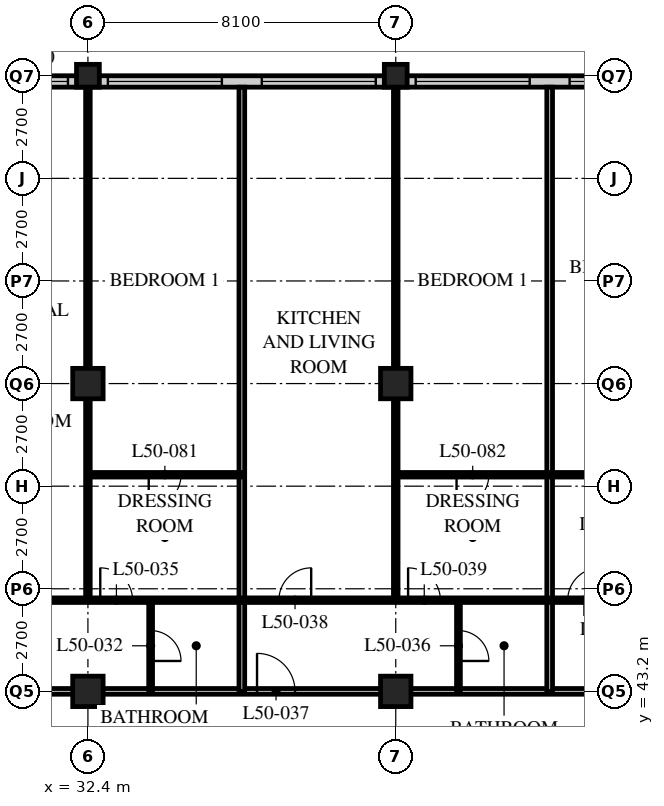
"""IFC4 building model, lengths in metres.
Left out: names, types, materials, properties, quantities, classifications, styles, units other than length and angle.
Written with IfcOpenShell. Run it as: python <this file> out.ifc"""

import sys

from ifc_helpers import new_model, si_unit, direction, frame, frame_2d, origin, origin_2d, place, context, subcontext, project, spatial, rectangle, hollow_rectangle, extrude, element, fill, save


model = new_model("IFC4")
c1 = context("Model", 3, precision=1e-05, world=origin(), true_north=direction((0.0, 1.0)))
c2 = subcontext(c1, "Body", "Model", "MODEL_VIEW")
j1 = project(units=[si_unit("LENGTHUNIT", "METRE"), si_unit("PLANEANGLEUNIT", "RADIAN")], contexts=[c1])
p1 = place(None, origin())
s1 = spatial("IfcSite", under=j1, at=p1, CompositionType="ELEMENT")
p2 = place(p1, origin())
s2 = spatial("IfcBuilding", under=s1, at=p2, CompositionType="ELEMENT")
p3 = place(p2, frame((0.0, 0.0, 195.6)))
s3 = spatial("IfcBuildingStorey", under=s2, at=p3, CompositionType="ELEMENT", Elevation=195.6)
for number, where, z_axis, x_axis in (
    (1, (32.4, 43.2, 0.0), (0.0, 0.0, 1.0), (1.0, 0.0, 0.0)),
    (2, (32.4, 51.3, 0.0), (0.0, 0.0, 1.0), (1.0, 0.0, 0.0)),
):
    element("IfcColumn", number, at=place(p3, frame(where, z_axis=z_axis, x_axis=x_axis)), inside=s3, PredefinedType="COLUMN", context=c2, shape_type="SweptSolid", body=[
        extrude(hollow_rectangle(XDim=0.8, YDim=0.8, WallThickness=0.08, at=origin_2d()), origin(), (0.0, 0.0, 1.0), 3.6),
    ])
p4 = place(p3, frame((32.4, 59.4, 0.0), z_axis=(0.0, 0.0, 1.0), x_axis=(1.0, 0.0, 0.0)))
e3 = element("IfcColumn", 3, at=p4, inside=s3, PredefinedType="COLUMN", context=c2, shape_type="SweptSolid", body=[
    extrude(hollow_rectangle(XDim=0.6, YDim=0.6, WallThickness=0.05, at=origin_2d()), origin(), (0.0, 0.0, 1.0), 3.6),
])
for number, where, z_axis, x_axis in (
    (4, (40.5, 43.2, 0.0), (0.0, 0.0, 1.0), (1.0, 0.0, 0.0)),
    (5, (40.5, 51.3, 0.0), (0.0, 0.0, 1.0), (1.0, 0.0, 0.0)),
):
    element("IfcColumn", number, at=place(p3, frame(where, z_axis=z_axis, x_axis=x_axis)), inside=s3, PredefinedType="COLUMN", context=c2, shape_type="SweptSolid", body=[
        extrude(hollow_rectangle(XDim=0.8, YDim=0.8, WallThickness=0.08, at=origin_2d()), origin(), (0.0, 0.0, 1.0), 3.6),
    ])
p5 = place(p3, frame((40.5, 59.4, 0.0), z_axis=(0.0, 0.0, 1.0), x_axis=(1.0, 0.0, 0.0)))
e6 = element("IfcColumn", 6, at=p5, inside=s3, PredefinedType="COLUMN", context=c2, shape_type="SweptSolid", body=[
    extrude(hollow_rectangle(XDim=0.6, YDim=0.6, WallThickness=0.05, at=origin_2d()), origin(), (0.0, 0.0, 1.0), 3.6),
])
p6 = place(p3, frame((48.3, 59.25, 0.0), z_axis=(0.0, 0.0, 1.0), x_axis=(-1.0, 0.0, 0.0)))
e7 = element("IfcWall", 7, at=p6, inside=s3, PredefinedType="SOLIDWALL", context=c2, shape_type="SweptSolid", body=[
    extrude(rectangle(XDim=40.2, YDim=0.3, at=frame_2d((20.1, 0.0))), origin(), (0.0, 0.0, 1.0), 3.39),
])
p7 = place(p6, frame((0.225, 0.0, 0.6)))
e8 = element("IfcOpeningElement", 8, at=p7, cuts=e7, PredefinedType="OPENING", context=c2, shape_type="SweptSolid", body=[
    extrude(rectangle(XDim=3.0, YDim=2.4, at=frame_2d((1.5, 1.2))), frame((0.0, 0.16, 0.0), z_axis=(0.0, -1.0, 0.0), x_axis=(1.0, 0.0, 0.0)), (0.0, 0.0, 1.0), 0.32),
])
p8 = place(p6, frame((4.275, 0.0, 0.6)))
e9 = element("IfcOpeningElement", 9, at=p8, cuts=e7, PredefinedType="OPENING", context=c2, shape_type="SweptSolid", body=[
    extrude(rectangle(XDim=3.0, YDim=2.4, at=frame_2d((1.5, 1.2))), frame((0.0, 0.16, 0.0), z_axis=(0.0, -1.0, 0.0), x_axis=(1.0, 0.0, 0.0)), (0.0, 0.0, 1.0), 0.32),
])
p9 = place(p6, frame((8.325, 0.0, 0.6)))
e10 = element("IfcOpeningElement", 10, at=p9, cuts=e7, PredefinedType="OPENING", context=c2, shape_type="SweptSolid", body=[
    extrude(rectangle(XDim=3.0, YDim=2.4, at=frame_2d((1.5, 1.2))), frame((0.0, 0.16, 0.0), z_axis=(0.0, -1.0, 0.0), x_axis=(1.0, 0.0, 0.0)), (0.0, 0.0, 1.0), 0.32),
])
p10 = place(p6, frame((12.375, 0.0, 0.6)))
e11 = element("IfcOpeningElement", 11, at=p10, cuts=e7, PredefinedType="OPENING", context=c2, shape_type="SweptSolid", body=[
    extrude(rectangle(XDim=3.0, YDim=2.4, at=frame_2d((1.5, 1.2))), frame((0.0, 0.16, 0.0), z_axis=(0.0, -1.0, 0.0), x_axis=(1.0, 0.0, 0.0)), (0.0, 0.0, 1.0), 0.32),
])
p11 = place(p6, frame((16.425, 0.0, 0.6)))
e12 = element("IfcOpeningElement", 12, at=p11, cuts=e7, PredefinedType="OPENING", context=c2, shape_type="SweptSolid", body=[
    extrude(rectangle(XDim=3.0, YDim=2.4, at=frame_2d((1.5, 1.2))), frame((0.0, 0.16, 0.0), z_axis=(0.0, -1.0, 0.0), x_axis=(1.0, 0.0, 0.0)), (0.0, 0.0, 1.0), 0.32),
])
p12 = place(p6, frame((20.475, 0.0, 0.6)))
e13 = element("IfcOpeningElement", 13, at=p12, cuts=e7, PredefinedType="OPENING", context=c2, shape_type="SweptSolid", body=[
    extrude(rectangle(XDim=3.0, YDim=2.4, at=frame_2d((1.5, 1.2))), frame((0.0, 0.16, 0.0), z_axis=(0.0, -1.0, 0.0), x_axis=(1.0, 0.0, 0.0)), (0.0, 0.0, 1.0), 0.32),
])
p13 = place(p6, frame((24.525, 0.0, 0.6)))
e14 = element("IfcOpeningElement", 14, at=p13, cuts=e7, PredefinedType="OPENING", context=c2, shape_type="SweptSolid", body=[
    extrude(rectangle(XDim=3.0, YDim=2.4, at=frame_2d((1.5, 1.2))), frame((0.0, 0.16, 0.0), z_axis=(0.0, -1.0, 0.0), x_axis=(1.0, 0.0, 0.0)), (0.0, 0.0, 1.0), 0.32),
])
p14 = place(p6, frame((28.575, 0.0, 0.6)))
e15 = element("IfcOpeningElement", 15, at=p14, cuts=e7, PredefinedType="OPENING", context=c2, shape_type="SweptSolid", body=[
    extrude(rectangle(XDim=3.0, YDim=2.4, at=frame_2d((1.5, 1.2))), frame((0.0, 0.16, 0.0), z_axis=(0.0, -1.0, 0.0), x_axis=(1.0, 0.0, 0.0)), (0.0, 0.0, 1.0), 0.32),
])
p15 = place(p6, frame((32.625, 0.0, 0.6)))
e16 = element("IfcOpeningElement", 16, at=p15, cuts=e7, PredefinedType="OPENING", context=c2, shape_type="SweptSolid", body=[
    extrude(rectangle(XDim=3.0, YDim=2.4, at=frame_2d((1.5, 1.2))), frame((0.0, 0.16, 0.0), z_axis=(0.0, -1.0, 0.0), x_axis=(1.0, 0.0, 0.0)), (0.0, 0.0, 1.0), 0.32),
])
p16 = place(p6, frame((36.675, 0.0, 0.6)))
e17 = element("IfcOpeningElement", 17, at=p16, cuts=e7, PredefinedType="OPENING", context=c2, shape_type="SweptSolid", body=[
    extrude(rectangle(XDim=3.0, YDim=2.4, at=frame_2d((1.5, 1.2))), frame((0.0, 0.16, 0.0), z_axis=(0.0, -1.0, 0.0), x_axis=(1.0, 0.0, 0.0)), (0.0, 0.0, 1.0), 0.32),
])
p17 = place(p3, frame((8.1, 43.2, 0.0), z_axis=(0.0, 0.0, 1.0), x_axis=(1.0, 0.0, 0.0)))
e18 = element("IfcWall", 18, at=p17, inside=s3, PredefinedType="PARTITIONING", context=c2, shape_type="SweptSolid", body=[
    extrude(rectangle(XDim=40.5, YDim=0.15, at=frame_2d((20.25, 0.0))), origin(), (0.0, 0.0, 1.0), 2.778),
])
p18 = place(p17, frame((4.45, 0.0, 0.0)))
e19 = element("IfcOpeningElement", 19, at=p18, cuts=e18, PredefinedType="OPENING", context=c2, shape_type="SweptSolid", body=[
    extrude(rectangle(XDim=1.0, YDim=2.1, at=frame_2d((0.5, 1.05))), frame((0.0, 0.085, 0.0), z_axis=(0.0, -1.0, 0.0), x_axis=(1.0, 0.0, 0.0)), (0.0, 0.0, 1.0), 0.17),
])
p19 = place(p17, frame((20.65, 0.0, 0.0)))
e20 = element("IfcOpeningElement", 20, at=p19, cuts=e18, PredefinedType="OPENING", context=c2, shape_type="SweptSolid", body=[
    extrude(rectangle(XDim=1.0, YDim=2.1, at=frame_2d((0.5, 1.05))), frame((0.0, 0.085, 0.0), z_axis=(0.0, -1.0, 0.0), x_axis=(1.0, 0.0, 0.0)), (0.0, 0.0, 1.0), 0.17),
])
p20 = place(p17, frame((28.75, 0.0, 0.0)))
e21 = element("IfcOpeningElement", 21, at=p20, cuts=e18, PredefinedType="OPENING", context=c2, shape_type="SweptSolid", body=[
    extrude(rectangle(XDim=1.0, YDim=2.1, at=frame_2d((0.5, 1.05))), frame((0.0, 0.085, 0.0), z_axis=(0.0, -1.0, 0.0), x_axis=(1.0, 0.0, 0.0)), (0.0, 0.0, 1.0), 0.17),
])
p21 = place(p17, frame((37.975, 0.0, 0.0)))
e22 = element("IfcOpeningElement", 22, at=p21, cuts=e18, PredefinedType="OPENING", context=c2, shape_type="SweptSolid", body=[
    extrude(rectangle(XDim=1.0, YDim=2.1, at=frame_2d((0.5, 1.05))), frame((0.0, 0.085, 0.0), z_axis=(0.0, -1.0, 0.0), x_axis=(1.0, 0.0, 0.0)), (0.0, 0.0, 1.0), 0.17),
])
p22 = place(p17, frame((1.525, 0.0, 0.0)))
e23 = element("IfcOpeningElement", 23, at=p22, cuts=e18, PredefinedType="OPENING", context=c2, shape_type="SweptSolid", body=[
    extrude(rectangle(XDim=1.0, YDim=2.1, at=frame_2d((0.5, 1.05))), frame((0.0, 0.085, 0.0), z_axis=(0.0, -1.0, 0.0), x_axis=(1.0, 0.0, 0.0)), (0.0, 0.0, 1.0), 0.17),
])
p23 = place(p3, frame((34.05, 43.2, 0.0), z_axis=(0.0, 0.0, 1.0), x_axis=(0.0, 1.0, 0.0)))
e24 = element("IfcWall", 24, at=p23, inside=s3, PredefinedType="PARTITIONING", context=c2, shape_type="SweptSolid", body=[
    extrude(rectangle(XDim=2.4, YDim=0.1, at=frame_2d((1.2, 0.0))), origin(), (0.0, 0.0, 1.0), 3.39),
])
p24 = place(p23, frame((0.8, 0.0, 0.0)))
e25 = element("IfcOpeningElement", 25, at=p24, cuts=e24, PredefinedType="OPENING", context=c2, shape_type="SweptSolid", body=[
    extrude(rectangle(XDim=0.8, YDim=2.1, at=frame_2d((0.4, 1.05))), frame((0.0, 0.06, 0.0), z_axis=(0.0, -1.0, 0.0), x_axis=(1.0, 0.0, 0.0)), (0.0, 0.0, 1.0), 0.12),
])
p25 = place(p3, frame((32.4, 45.6, 0.0), z_axis=(0.0, 0.0, 1.0), x_axis=(0.0, 1.0, 0.0)))
e26 = element("IfcWall", 26, at=p25, inside=s3, PredefinedType="PARTITIONING", context=c2, shape_type="SweptSolid", body=[
    extrude(rectangle(XDim=13.5, YDim=0.12, at=frame_2d((6.75, 0.0))), origin(), (0.0, 0.0, 1.0), 2.778),
])
p26 = place(p3, frame((36.45, 43.2, 0.0), z_axis=(0.0, 0.0, 1.0), x_axis=(0.0, 1.0, 0.0)))
e27 = element("IfcWall", 27, at=p26, inside=s3, PredefinedType="PARTITIONING", context=c2, shape_type="SweptSolid", body=[
    extrude(rectangle(XDim=15.9, YDim=0.15, at=frame_2d((7.95, 0.0))), origin(), (0.0, 0.0, 1.0), 3.39),
])
p27 = place(p3, frame((42.15, 43.2, 0.0), z_axis=(0.0, 0.0, 1.0), x_axis=(0.0, 1.0, 0.0)))
e28 = element("IfcWall", 28, at=p27, inside=s3, PredefinedType="PARTITIONING", context=c2, shape_type="SweptSolid", body=[
    extrude(rectangle(XDim=2.4, YDim=0.1, at=frame_2d((1.2, 0.0))), origin(), (0.0, 0.0, 1.0), 3.39),
])
p28 = place(p27, frame((0.8, 0.0, 0.0)))
e29 = element("IfcOpeningElement", 29, at=p28, cuts=e28, PredefinedType="OPENING", context=c2, shape_type="SweptSolid", body=[
    extrude(rectangle(XDim=0.8, YDim=2.1, at=frame_2d((0.4, 1.05))), frame((0.0, 0.06, 0.0), z_axis=(0.0, -1.0, 0.0), x_axis=(1.0, 0.0, 0.0)), (0.0, 0.0, 1.0), 0.12),
])
p29 = place(p3, frame((40.5, 45.6, 0.0), z_axis=(0.0, 0.0, 1.0), x_axis=(0.0, 1.0, 0.0)))
e30 = element("IfcWall", 30, at=p29, inside=s3, PredefinedType="PARTITIONING", context=c2, shape_type="SweptSolid", body=[
    extrude(rectangle(XDim=13.5, YDim=0.12, at=frame_2d((6.75, 0.0))), origin(), (0.0, 0.0, 1.0), 2.778),
])
p30 = place(p3, frame((44.55, 43.2, 0.0), z_axis=(0.0, 0.0, 1.0), x_axis=(0.0, 1.0, 0.0)))
e31 = element("IfcWall", 31, at=p30, inside=s3, PredefinedType="PARTITIONING", context=c2, shape_type="SweptSolid", body=[
    extrude(rectangle(XDim=15.9, YDim=0.15, at=frame_2d((7.95, 0.0))), origin(), (0.0, 0.0, 1.0), 3.39),
])
p31 = place(p3, frame((4.1, 45.6, 0.0), z_axis=(0.0, 0.0, 1.0), x_axis=(1.0, 0.0, 0.0)))
e32 = element("IfcWall", 32, at=p31, inside=s3, PredefinedType="PARTITIONING", context=c2, shape_type="SweptSolid", body=[
    extrude(rectangle(XDim=48.5, YDim=0.12, at=frame_2d((24.25, 0.0))), origin(), (0.0, 0.0, 1.0), 3.39),
])
p32 = place(p31, frame((9.025, 0.0, 0.0)))
e33 = element("IfcOpeningElement", 33, at=p32, cuts=e32, PredefinedType="OPENING", context=c2, shape_type="SweptSolid", body=[
    extrude(rectangle(XDim=0.85, YDim=2.1, at=frame_2d((0.425, 1.05))), frame((0.0, 0.07, 0.0), z_axis=(0.0, -1.0, 0.0), x_axis=(1.0, 0.0, 0.0)), (0.0, 0.0, 1.0), 0.14),
])
p33 = place(p31, frame((16.475, 0.0, 0.0)))
e34 = element("IfcOpeningElement", 34, at=p33, cuts=e32, PredefinedType="OPENING", context=c2, shape_type="SweptSolid", body=[
    extrude(rectangle(XDim=0.85, YDim=2.1, at=frame_2d((0.425, 1.05))), frame((0.0, 0.07, 0.0), z_axis=(0.0, -1.0, 0.0), x_axis=(1.0, 0.0, 0.0)), (0.0, 0.0, 1.0), 0.14),
])
p34 = place(p31, frame((20.525, 0.0, 0.0)))
e35 = element("IfcOpeningElement", 35, at=p34, cuts=e32, PredefinedType="OPENING", context=c2, shape_type="SweptSolid", body=[
    extrude(rectangle(XDim=0.85, YDim=2.1, at=frame_2d((0.425, 1.05))), frame((0.0, 0.07, 0.0), z_axis=(0.0, -1.0, 0.0), x_axis=(1.0, 0.0, 0.0)), (0.0, 0.0, 1.0), 0.14),
])
p35 = place(p31, frame((25.225, 0.0, 0.0)))
e36 = element("IfcOpeningElement", 36, at=p35, cuts=e32, PredefinedType="OPENING", context=c2, shape_type="SweptSolid", body=[
    extrude(rectangle(XDim=0.85, YDim=2.1, at=frame_2d((0.425, 1.05))), frame((0.0, 0.07, 0.0), z_axis=(0.0, -1.0, 0.0), x_axis=(1.0, 0.0, 0.0)), (0.0, 0.0, 1.0), 0.14),
])
p36 = place(p31, frame((28.625, 0.0, 0.0)))
e37 = element("IfcOpeningElement", 37, at=p36, cuts=e32, PredefinedType="OPENING", context=c2, shape_type="SweptSolid", body=[
    extrude(rectangle(XDim=0.85, YDim=2.1, at=frame_2d((0.425, 1.05))), frame((0.0, 0.07, 0.0), z_axis=(0.0, -1.0, 0.0), x_axis=(1.0, 0.0, 0.0)), (0.0, 0.0, 1.0), 0.14),
])
p37 = place(p31, frame((33.325, 0.0, 0.0)))
e38 = element("IfcOpeningElement", 38, at=p37, cuts=e32, PredefinedType="OPENING", context=c2, shape_type="SweptSolid", body=[
    extrude(rectangle(XDim=0.85, YDim=2.1, at=frame_2d((0.425, 1.05))), frame((0.0, 0.07, 0.0), z_axis=(0.0, -1.0, 0.0), x_axis=(1.0, 0.0, 0.0)), (0.0, 0.0, 1.0), 0.14),
])
p38 = place(p31, frame((36.725, 0.0, 0.0)))
e39 = element("IfcOpeningElement", 39, at=p38, cuts=e32, PredefinedType="OPENING", context=c2, shape_type="SweptSolid", body=[
    extrude(rectangle(XDim=0.85, YDim=2.1, at=frame_2d((0.425, 1.05))), frame((0.0, 0.07, 0.0), z_axis=(0.0, -1.0, 0.0), x_axis=(1.0, 0.0, 0.0)), (0.0, 0.0, 1.0), 0.14),
])
p39 = place(p31, frame((40.925, 0.0, 0.0)))
e40 = element("IfcOpeningElement", 40, at=p39, cuts=e32, PredefinedType="OPENING", context=c2, shape_type="SweptSolid", body=[
    extrude(rectangle(XDim=0.85, YDim=2.1, at=frame_2d((0.425, 1.05))), frame((0.0, 0.07, 0.0), z_axis=(0.0, -1.0, 0.0), x_axis=(1.0, 0.0, 0.0)), (0.0, 0.0, 1.0), 0.14),
])
p40 = place(p31, frame((44.775, 0.0, 0.0)))
e41 = element("IfcOpeningElement", 41, at=p40, cuts=e32, PredefinedType="OPENING", context=c2, shape_type="SweptSolid", body=[
    extrude(rectangle(XDim=0.85, YDim=2.1, at=frame_2d((0.425, 1.05))), frame((0.0, 0.07, 0.0), z_axis=(0.0, -1.0, 0.0), x_axis=(1.0, 0.0, 0.0)), (0.0, 0.0, 1.0), 0.14),
])
p41 = place(p31, frame((6.725, 0.0, 0.0)))
e42 = element("IfcOpeningElement", 42, at=p41, cuts=e32, PredefinedType="OPENING", context=c2, shape_type="SweptSolid", body=[
    extrude(rectangle(XDim=0.85, YDim=2.1, at=frame_2d((0.425, 1.05))), frame((0.0, 0.07, 0.0), z_axis=(0.0, -1.0, 0.0), x_axis=(1.0, 0.0, 0.0)), (0.0, 0.0, 1.0), 0.14),
])
p42 = place(p31, frame((2.875, 0.0, 0.0)))
e43 = element("IfcOpeningElement", 43, at=p42, cuts=e32, PredefinedType="OPENING", context=c2, shape_type="SweptSolid", body=[
    extrude(rectangle(XDim=0.85, YDim=2.1, at=frame_2d((0.425, 1.05))), frame((0.0, 0.07, 0.0), z_axis=(0.0, -1.0, 0.0), x_axis=(1.0, 0.0, 0.0)), (0.0, 0.0, 1.0), 0.14),
])
p43 = place(p3, frame((32.4, 48.9, 0.0), z_axis=(0.0, 0.0, 1.0), x_axis=(1.0, 0.0, 0.0)))
e44 = element("IfcWall", 44, at=p43, inside=s3, PredefinedType="PARTITIONING", context=c2, shape_type="SweptSolid", body=[
    extrude(rectangle(XDim=4.05, YDim=0.12, at=frame_2d((2.025, 0.0))), origin(), (0.0, 0.0, 1.0), 3.39),
])
p44 = place(p43, frame((1.6, 0.0, 0.0)))
e45 = element("IfcOpeningElement", 45, at=p44, cuts=e44, PredefinedType="OPENING", context=c2, shape_type="SweptSolid", body=[
    extrude(rectangle(XDim=0.85, YDim=2.1, at=frame_2d((0.425, 1.05))), frame((0.0, 0.07, 0.0), z_axis=(0.0, -1.0, 0.0), x_axis=(1.0, 0.0, 0.0)), (0.0, 0.0, 1.0), 0.14),
])
p45 = place(p3, frame((40.5, 48.9, 0.0), z_axis=(0.0, 0.0, 1.0), x_axis=(1.0, 0.0, 0.0)))
e46 = element("IfcWall", 46, at=p45, inside=s3, PredefinedType="PARTITIONING", context=c2, shape_type="SweptSolid", body=[
    extrude(rectangle(XDim=8.1, YDim=0.12, at=frame_2d((4.05, 0.0))), origin(), (0.0, 0.0, 1.0), 3.39),
])
p46 = place(p45, frame((1.6, 0.0, 0.0)))
e47 = element("IfcOpeningElement", 47, at=p46, cuts=e46, PredefinedType="OPENING", context=c2, shape_type="SweptSolid", body=[
    extrude(rectangle(XDim=0.85, YDim=2.1, at=frame_2d((0.425, 1.05))), frame((0.0, 0.07, 0.0), z_axis=(0.0, -1.0, 0.0), x_axis=(1.0, 0.0, 0.0)), (0.0, 0.0, 1.0), 0.14),
])
p47 = place(p45, frame((5.65, 0.0, 0.0)))
e48 = element("IfcOpeningElement", 48, at=p47, cuts=e46, PredefinedType="OPENING", context=c2, shape_type="SweptSolid", body=[
    extrude(rectangle(XDim=0.85, YDim=2.1, at=frame_2d((0.425, 1.05))), frame((0.0, 0.07, 0.0), z_axis=(0.0, -1.0, 0.0), x_axis=(1.0, 0.0, 0.0)), (0.0, 0.0, 1.0), 0.14),
])
p48 = place(p7, origin())
e49 = element("IfcWindow", 49, at=p48, inside=s3, PartitioningType="SINGLE_PANEL", PredefinedType="WINDOW", context=c2, shape_type="SweptSolid", body=[
    extrude(rectangle(XDim=3.0, YDim=2.4, at=frame_2d((1.5, 1.2))), frame((0.0, 0.03, 0.0), z_axis=(0.0, -1.0, 0.0), x_axis=(1.0, 0.0, 0.0)), (0.0, 0.0, 1.0), 0.06),
])
fill(e8, e49)
p49 = place(p8, origin())
e50 = element("IfcWindow", 50, at=p49, inside=s3, PartitioningType="SINGLE_PANEL", PredefinedType="WINDOW", context=c2, shape_type="SweptSolid", body=[
    extrude(rectangle(XDim=3.0, YDim=2.4, at=frame_2d((1.5, 1.2))), frame((0.0, 0.03, 0.0), z_axis=(0.0, -1.0, 0.0), x_axis=(1.0, 0.0, 0.0)), (0.0, 0.0, 1.0), 0.06),
])
fill(e9, e50)
p50 = place(p9, origin())
e51 = element("IfcWindow", 51, at=p50, inside=s3, PartitioningType="SINGLE_PANEL", PredefinedType="WINDOW", context=c2, shape_type="SweptSolid", body=[
    extrude(rectangle(XDim=3.0, YDim=2.4, at=frame_2d((1.5, 1.2))), frame((0.0, 0.03, 0.0), z_axis=(0.0, -1.0, 0.0), x_axis=(1.0, 0.0, 0.0)), (0.0, 0.0, 1.0), 0.06),
])
fill(e10, e51)
p51 = place(p10, origin())
e52 = element("IfcWindow", 52, at=p51, inside=s3, PartitioningType="SINGLE_PANEL", PredefinedType="WINDOW", context=c2, shape_type="SweptSolid", body=[
    extrude(rectangle(XDim=3.0, YDim=2.4, at=frame_2d((1.5, 1.2))), frame((0.0, 0.03, 0.0), z_axis=(0.0, -1.0, 0.0), x_axis=(1.0, 0.0, 0.0)), (0.0, 0.0, 1.0), 0.06),
])
fill(e11, e52)
p52 = place(p11, origin())
e53 = element("IfcWindow", 53, at=p52, inside=s3, PartitioningType="SINGLE_PANEL", PredefinedType="WINDOW", context=c2, shape_type="SweptSolid", body=[
    extrude(rectangle(XDim=3.0, YDim=2.4, at=frame_2d((1.5, 1.2))), frame((0.0, 0.03, 0.0), z_axis=(0.0, -1.0, 0.0), x_axis=(1.0, 0.0, 0.0)), (0.0, 0.0, 1.0), 0.06),
])
fill(e12, e53)
p53 = place(p24, origin())
e54 = element("IfcDoor", 54, at=p53, inside=s3, OperationType="SINGLE_SWING_RIGHT", PredefinedType="DOOR", context=c2, shape_type="SweptSolid", body=[
    extrude(rectangle(XDim=0.8, YDim=2.1, at=frame_2d((0.4, 1.05))), frame((0.0, 0.025, 0.0), z_axis=(0.0, -1.0, 0.0), x_axis=(1.0, 0.0, 0.0)), (0.0, 0.0, 1.0), 0.05),
])
fill(e25, e54)
p54 = place(p36, origin())
e55 = element("IfcDoor", 55, at=p54, inside=s3, OperationType="SINGLE_SWING_LEFT", PredefinedType="DOOR", context=c2, shape_type="SweptSolid", body=[
    extrude(rectangle(XDim=0.85, YDim=2.1, at=frame_2d((0.425, 1.05))), frame((0.0, 0.025, 0.0), z_axis=(0.0, -1.0, 0.0), x_axis=(1.0, 0.0, 0.0)), (0.0, 0.0, 1.0), 0.05),
])
fill(e37, e55)
p55 = place(p28, origin())
e56 = element("IfcDoor", 56, at=p55, inside=s3, OperationType="SINGLE_SWING_RIGHT", PredefinedType="DOOR", context=c2, shape_type="SweptSolid", body=[
    extrude(rectangle(XDim=0.8, YDim=2.1, at=frame_2d((0.4, 1.05))), frame((0.0, 0.025, 0.0), z_axis=(0.0, -1.0, 0.0), x_axis=(1.0, 0.0, 0.0)), (0.0, 0.0, 1.0), 0.05),
])
fill(e29, e56)
p56 = place(p20, origin())
e57 = element("IfcDoor", 57, at=p56, inside=s3, OperationType="SINGLE_SWING_LEFT", PredefinedType="DOOR", context=c2, shape_type="SweptSolid", body=[
    extrude(rectangle(XDim=1.0, YDim=2.1, at=frame_2d((0.5, 1.05))), frame((0.0, 0.025, 0.0), z_axis=(0.0, -1.0, 0.0), x_axis=(1.0, 0.0, 0.0)), (0.0, 0.0, 1.0), 0.05),
])
fill(e21, e57)
p57 = place(p37, origin())
e58 = element("IfcDoor", 58, at=p57, inside=s3, OperationType="SINGLE_SWING_RIGHT", PredefinedType="DOOR", context=c2, shape_type="SweptSolid", body=[
    extrude(rectangle(XDim=0.85, YDim=2.1, at=frame_2d((0.425, 1.05))), frame((0.0, 0.025, 0.0), z_axis=(0.0, -1.0, 0.0), x_axis=(1.0, 0.0, 0.0)), (0.0, 0.0, 1.0), 0.05),
])
fill(e38, e58)
p58 = place(p38, origin())
e59 = element("IfcDoor", 59, at=p58, inside=s3, OperationType="SINGLE_SWING_LEFT", PredefinedType="DOOR", context=c2, shape_type="SweptSolid", body=[
    extrude(rectangle(XDim=0.85, YDim=2.1, at=frame_2d((0.425, 1.05))), frame((0.0, 0.025, 0.0), z_axis=(0.0, -1.0, 0.0), x_axis=(1.0, 0.0, 0.0)), (0.0, 0.0, 1.0), 0.05),
])
fill(e39, e59)
p59 = place(p39, origin())
e60 = element("IfcDoor", 60, at=p59, inside=s3, OperationType="SINGLE_SWING_RIGHT", PredefinedType="DOOR", context=c2, shape_type="SweptSolid", body=[
    extrude(rectangle(XDim=0.85, YDim=2.1, at=frame_2d((0.425, 1.05))), frame((0.0, 0.025, 0.0), z_axis=(0.0, -1.0, 0.0), x_axis=(1.0, 0.0, 0.0)), (0.0, 0.0, 1.0), 0.05),
])
fill(e40, e60)
p60 = place(p44, origin())
e61 = element("IfcDoor", 61, at=p60, inside=s3, OperationType="SINGLE_SWING_RIGHT", PredefinedType="DOOR", context=c2, shape_type="SweptSolid", body=[
    extrude(rectangle(XDim=0.85, YDim=2.1, at=frame_2d((0.425, 1.05))), frame((0.0, 0.025, 0.0), z_axis=(0.0, -1.0, 0.0), x_axis=(1.0, 0.0, 0.0)), (0.0, 0.0, 1.0), 0.05),
])
fill(e45, e61)
p61 = place(p46, origin())
e62 = element("IfcDoor", 62, at=p61, inside=s3, OperationType="SINGLE_SWING_RIGHT", PredefinedType="DOOR", context=c2, shape_type="SweptSolid", body=[
    extrude(rectangle(XDim=0.85, YDim=2.1, at=frame_2d((0.425, 1.05))), frame((0.0, 0.025, 0.0), z_axis=(0.0, -1.0, 0.0), x_axis=(1.0, 0.0, 0.0)), (0.0, 0.0, 1.0), 0.05),
])
fill(e47, e62)
save(model, sys.argv[1])
